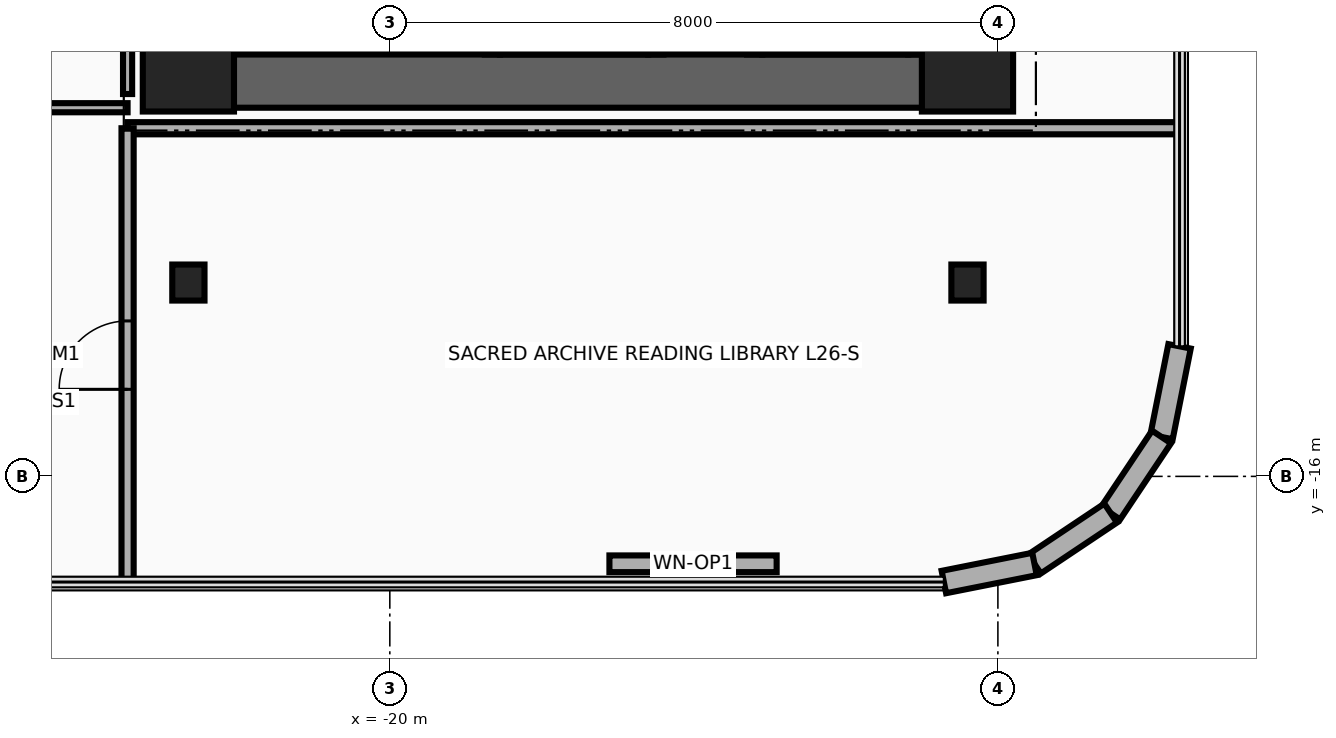
"""IFC4 building model, lengths in metres.
Left out: names, types, materials, properties, quantities, classifications, styles, units other than length and angle.
Written with IfcOpenShell. Run it as: python <this file> out.ifc"""

import sys

from ifc_helpers import new_model, si_unit, direction, frame, frame_2d, origin, origin_2d, place, context, subcontext, project, spatial, rectangle, i_section, extrude, source, transform, mapped, element, fill, save


model = new_model("IFC4")
c1 = context("Model", 3, precision=1e-05, world=origin(), true_north=direction((0.0, 1.0)))
c2 = subcontext(c1, "Body", "Model", "MODEL_VIEW")
j1 = project(units=[si_unit("LENGTHUNIT", "METRE"), si_unit("PLANEANGLEUNIT", "RADIAN")], contexts=[c1])
p1 = place(None, origin())
s1 = spatial("IfcSite", under=j1, at=p1, CompositionType="ELEMENT")
p2 = place(p1, origin())
s2 = spatial("IfcBuilding", under=s1, at=p2, CompositionType="ELEMENT")
p3 = place(p2, frame((0.0, 0.0, 105.7)))
s3 = spatial("IfcBuildingStorey", under=s2, at=p3, CompositionType="ELEMENT", Elevation=105.7)
for number, where, z_axis, x_axis in (
    (1, (-22.16, -10.45, 0.0), (0.0, 0.0, 1.0), (0.0, 1.0, 0.0)),
    (2, (-18.83, -10.45, 0.0), (0.0, 0.0, 1.0), (0.0, 1.0, 0.0)),
):
    element("IfcWall", number, at=place(p3, frame(where, z_axis=z_axis, x_axis=x_axis)), inside=s3, PredefinedType="SHEAR", context=c2, shape_type="SweptSolid", body=[
        extrude(rectangle(XDim=8.67, YDim=0.22, at=frame_2d((4.335, 0.0))), origin(), (0.0, 0.0, 1.0), 3.46),
    ])
p4 = place(p3, frame((-22.65, -11.15, 0.0), z_axis=(0.0, 0.0, 1.0), x_axis=(0.0, 1.0, 0.0)))
e3 = element("IfcWall", 3, at=p4, inside=s3, PredefinedType="SHEAR", context=c2, shape_type="SweptSolid", body=[
    extrude(rectangle(XDim=22.3, YDim=0.7, at=frame_2d((11.15, 0.0))), origin(), (0.0, 0.0, 1.0), 3.46),
])
p5 = place(p3, frame((-22.65, -10.8, 0.0), z_axis=(0.0, 0.0, 1.0), x_axis=(1.0, 0.0, 0.0)))
e4 = element("IfcWall", 4, at=p5, inside=s3, PredefinedType="SHEAR", context=c2, shape_type="SweptSolid", body=[
    extrude(rectangle(XDim=10.25, YDim=0.7, at=frame_2d((5.125, 0.0))), origin(), (0.0, 0.0, 1.0), 3.46),
])
m1 = source(origin(), c2, "Body", "SweptSolid", [
    extrude(rectangle(XDim=1.2, YDim=1.2, at=origin_2d()), origin(), (0.0, 0.0, 1.0), 3.7),
])
for number, where, z_axis, x_axis in (
    (5, (-22.65, -10.6, 0.0), (0.0, 0.0, 1.0), (1.0, 0.0, 0.0)),
    (6, (-12.4, -10.6, 0.0), (0.0, 0.0, 1.0), (1.0, 0.0, 0.0)),
):
    element("IfcColumn", number, at=place(p3, frame(where, z_axis=z_axis, x_axis=x_axis)), inside=s3, PredefinedType="COLUMN", context=c2, shape_type="MappedRepresentation", body=[
        mapped(m1, transform((0.0, 0.0, 0.0), x_axis=(1.0, 0.0, 0.0), y_axis=(0.0, 1.0, 0.0), z_axis=(0.0, 0.0, 1.0), scale=1.0)),
    ])
m2 = source(origin(), c2, "Body", "SweptSolid", [
    extrude(i_section(OverallWidth=0.424, OverallDepth=0.474, WebThickness=0.048, FlangeThickness=0.077, at=origin_2d()), origin(), (0.0, 0.0, 1.0), 3.7),
])
for number, where, z_axis, x_axis in (
    (7, (-22.65, -13.45, 0.0), (0.0, 0.0, 1.0), (1.0, 0.0, 0.0)),
    (8, (-12.4, -13.45, 0.0), (0.0, 0.0, 1.0), (1.0, 0.0, 0.0)),
):
    element("IfcColumn", number, at=place(p3, frame(where, z_axis=z_axis, x_axis=x_axis)), inside=s3, PredefinedType="COLUMN", context=c2, shape_type="MappedRepresentation", body=[
        mapped(m2, transform((0.0, 0.0, 0.0), x_axis=(1.0, 0.0, 0.0), y_axis=(0.0, 1.0, 0.0), z_axis=(0.0, 0.0, 1.0), scale=1.0)),
    ])
p6 = place(p3, frame((-9.61, -14.289, 0.0), z_axis=(0.0, 0.0, 1.0), x_axis=(-0.194996050505, -0.980804027463, 0.0)))
e9 = element("IfcWall", 9, at=p6, inside=s3, PredefinedType="SOLIDWALL", context=c2, shape_type="SweptSolid", body=[
    extrude(rectangle(XDim=1.216, YDim=0.3, at=frame_2d((0.608, 0.0))), origin(), (0.0, 0.0, 1.0), 3.46),
])
for number, where, z_axis, x_axis in (
    (10, (-9.847, -15.482, 0.0), (0.0, 0.0, 1.0), (-0.556, -0.831, 0.0)),
    (11, (-10.517, -16.483, 0.0), (0.0, 0.0, 1.0), (-0.831, -0.556, 0.0)),
):
    element("IfcWall", number, at=place(p3, frame(where, z_axis=z_axis, x_axis=x_axis)), inside=s3, PredefinedType="SOLIDWALL", context=c2, shape_type="SweptSolid", body=[
        extrude(rectangle(XDim=1.205, YDim=0.3, at=frame_2d((0.603, 0.0))), origin(), (0.0, 0.0, 1.0), 3.46),
    ])
p7 = place(p3, frame((-11.518, -17.153, 0.0), z_axis=(0.0, 0.0, 1.0), x_axis=(-0.980804027463, -0.194996050505, 0.0)))
e12 = element("IfcWall", 12, at=p7, inside=s3, PredefinedType="SOLIDWALL", context=c2, shape_type="SweptSolid", body=[
    extrude(rectangle(XDim=1.216, YDim=0.3, at=frame_2d((0.608, 0.0))), origin(), (0.0, 0.0, 1.0), 3.46),
])
p8 = place(p3, frame((-14.911, -17.15, 0.0), z_axis=(0.0, 0.0, 1.0), x_axis=(-1.0, 0.0, 0.0)))
e13 = element("IfcWall", 13, at=p8, inside=s3, PredefinedType="SOLIDWALL", context=c2, shape_type="SweptSolid", body=[
    extrude(rectangle(XDim=2.2, YDim=0.22, at=frame_2d((1.1, 0.0))), origin(), (0.0, 0.0, 1.0), 3.46),
])
p9 = place(p8, frame((0.65, 0.0, 0.95)))
e14 = element("IfcOpeningElement", 14, at=p9, cuts=e13, PredefinedType="OPENING", context=c2, shape_type="SweptSolid", body=[
    extrude(rectangle(XDim=0.9, YDim=1.3, at=frame_2d((0.45, 0.65))), frame((0.0, 0.125, 0.0), z_axis=(0.0, -1.0, 0.0), x_axis=(1.0, 0.0, 0.0)), (0.0, 0.0, 1.0), 0.25),
])
for number, where, z_axis, x_axis in (
    (15, (-15.2, -10.45, 0.0), (0.0, 0.0, 1.0), (0.0, 1.0, 0.0)),
    (16, (-13.08, -10.45, 0.0), (0.0, 0.0, 1.0), (0.0, 1.0, 0.0)),
):
    element("IfcWall", number, at=place(p3, frame(where, z_axis=z_axis, x_axis=x_axis)), inside=s3, PredefinedType="MOVABLE", context=c2, shape_type="SweptSolid", body=[
        extrude(rectangle(XDim=2.35, YDim=0.2, at=frame_2d((1.175, 0.0))), origin(), (0.0, 0.0, 1.0), 2.666),
    ])
p10 = place(p3, frame((-15.1, -10.35, 0.0), z_axis=(0.0, 0.0, 1.0), x_axis=(1.0, 0.0, 0.0)))
e17 = element("IfcWall", 17, at=p10, inside=s3, PredefinedType="MOVABLE", context=c2, shape_type="SweptSolid", body=[
    extrude(rectangle(XDim=1.92, YDim=0.2, at=frame_2d((0.96, 0.0))), origin(), (0.0, 0.0, 1.0), 2.666),
])
for number, where, z_axis, x_axis in (
    (18, (-18.65, -10.45, 0.0), (0.0, 0.0, 1.0), (0.0, 1.0, 0.0)),
    (19, (-16.5, -10.45, 0.0), (0.0, 0.0, 1.0), (0.0, 1.0, 0.0)),
):
    element("IfcWall", number, at=place(p3, frame(where, z_axis=z_axis, x_axis=x_axis)), inside=s3, PredefinedType="MOVABLE", context=c2, shape_type="SweptSolid", body=[
        extrude(rectangle(XDim=2.35, YDim=0.2, at=frame_2d((1.175, 0.0))), origin(), (0.0, 0.0, 1.0), 2.666),
    ])
p11 = place(p3, frame((-18.55, -10.35, 0.0), z_axis=(0.0, 0.0, 1.0), x_axis=(1.0, 0.0, 0.0)))
e20 = element("IfcWall", 20, at=p11, inside=s3, PredefinedType="MOVABLE", context=c2, shape_type="SweptSolid", body=[
    extrude(rectangle(XDim=1.95, YDim=0.2, at=frame_2d((0.975, 0.0))), origin(), (0.0, 0.0, 1.0), 2.666),
])
p12 = place(p3, frame((-23.45, -11.42, 0.0), z_axis=(0.0, 0.0, 1.0), x_axis=(1.0, 0.0, 0.0)))
e21 = element("IfcWall", 21, at=p12, inside=s3, PredefinedType="PARTITIONING", context=c2, shape_type="SweptSolid", body=[
    extrude(rectangle(XDim=13.84, YDim=0.16, at=frame_2d((6.92, 0.0))), origin(), (0.0, 0.0, 1.0), 2.834),
])
p13 = place(p3, frame((-23.45, -17.39, 0.0), z_axis=(0.0, 0.0, 1.0), x_axis=(0.0, 1.0, 0.0)))
e22 = element("IfcWall", 22, at=p13, inside=s3, PredefinedType="PARTITIONING", context=c2, shape_type="SweptSolid", body=[
    extrude(rectangle(XDim=5.97, YDim=0.16, at=frame_2d((2.985, 0.0))), origin(), (0.0, 0.0, 1.0), 3.46),
])
p14 = place(p13, frame((2.535, 0.0, 0.0)))
e23 = element("IfcOpeningElement", 23, at=p14, cuts=e22, PredefinedType="OPENING", context=c2, shape_type="SweptSolid", body=[
    extrude(rectangle(XDim=0.9, YDim=2.1, at=frame_2d((0.45, 1.05))), frame((0.0, 0.095, 0.0), z_axis=(0.0, -1.0, 0.0), x_axis=(1.0, 0.0, 0.0)), (0.0, 0.0, 1.0), 0.19),
])
p15 = place(p3, frame((-27.468, -11.15, 0.0), z_axis=(0.0, 0.0, 1.0), x_axis=(1.0, 0.0, 0.0)))
e24 = element("IfcWall", 24, at=p15, inside=s3, PredefinedType="PARTITIONING", context=c2, shape_type="SweptSolid", body=[
    extrude(rectangle(XDim=4.018, YDim=0.12, at=frame_2d((2.009, 0.0))), origin(), (0.0, 0.0, 1.0), 3.46),
])
p16 = place(p3, frame((-23.45, -10.97, 0.0), z_axis=(0.0, 0.0, 1.0), x_axis=(0.0, 1.0, 0.0)))
e25 = element("IfcWall", 25, at=p16, inside=s3, PredefinedType="PARTITIONING", context=c2, shape_type="SweptSolid", body=[
    extrude(rectangle(XDim=1.59, YDim=0.12, at=frame_2d((0.795, 0.0))), origin(), (0.0, 0.0, 1.0), 2.666),
])
p17 = place(p9, origin())
e26 = element("IfcWindow", 26, at=p17, inside=s3, PartitioningType="SINGLE_PANEL", PredefinedType="WINDOW", context=c2, shape_type="SweptSolid", body=[
    extrude(rectangle(XDim=0.9, YDim=1.3, at=frame_2d((0.45, 0.65))), frame((0.0, 0.03, 0.0), z_axis=(0.0, -1.0, 0.0), x_axis=(1.0, 0.0, 0.0)), (0.0, 0.0, 1.0), 0.06),
])
fill(e14, e26)
p18 = place(p14, origin())
e27 = element("IfcDoor", 27, at=p18, inside=s3, OperationType="SINGLE_SWING_RIGHT", PredefinedType="DOOR", context=c2, shape_type="SweptSolid", body=[
    extrude(rectangle(XDim=0.9, YDim=2.1, at=frame_2d((0.45, 1.05))), frame((0.0, 0.025, 0.0), z_axis=(0.0, -1.0, 0.0), x_axis=(1.0, 0.0, 0.0)), (0.0, 0.0, 1.0), 0.05),
])
fill(e23, e27)
save(model, sys.argv[1])
